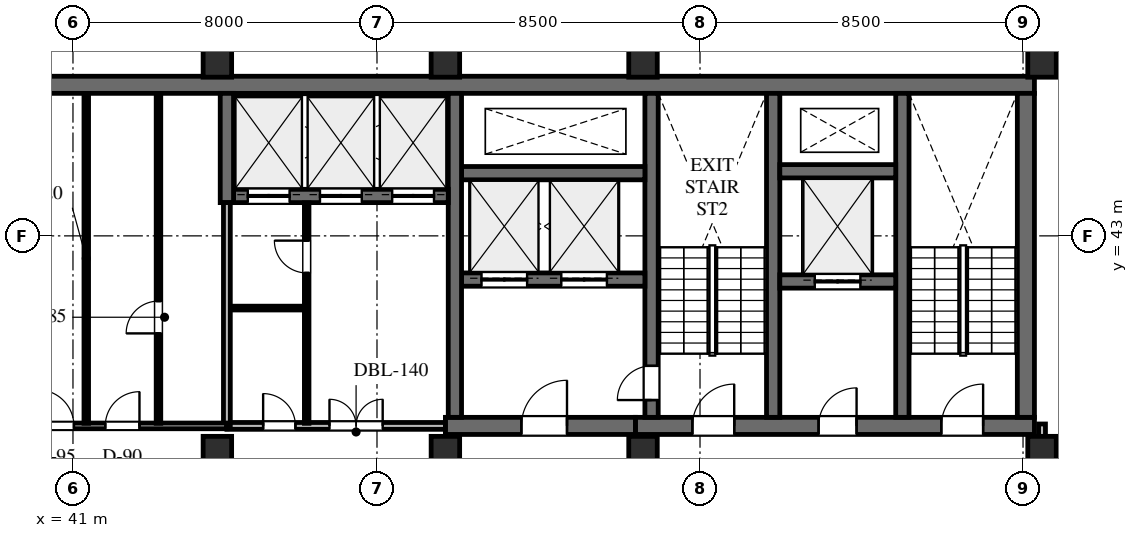
"""IFC4 building model, lengths in metres.
Left out: names, types, materials, properties, quantities, classifications, styles, units other than length and angle.
Written with IfcOpenShell. Run it as: python <this file> out.ifc"""

import sys

from ifc_helpers import new_model, si_unit, direction, frame, frame_2d, origin, origin_2d, place, context, subcontext, project, spatial, rectangle, extrude, element, fill, save


model = new_model("IFC4")
c1 = context("Model", 3, precision=1e-05, world=origin(), true_north=direction((0.0, 1.0)))
c2 = subcontext(c1, "Body", "Model", "MODEL_VIEW")
j1 = project(units=[si_unit("LENGTHUNIT", "METRE"), si_unit("PLANEANGLEUNIT", "RADIAN")], contexts=[c1])
p1 = place(None, origin())
s1 = spatial("IfcSite", under=j1, at=p1, CompositionType="ELEMENT")
p2 = place(p1, origin())
s2 = spatial("IfcBuilding", under=s1, at=p2, CompositionType="ELEMENT")
p3 = place(p2, frame((0.0, 0.0, 241.8)))
s3 = spatial("IfcBuildingStorey", under=s2, at=p3, CompositionType="ELEMENT", Elevation=241.8)
p4 = place(p3, frame((22.9, 46.975, 0.0), z_axis=(0.0, 0.0, 1.0), x_axis=(1.0, 0.0, 0.0)))
e1 = element("IfcWall", 1, at=p4, inside=s3, PredefinedType="SHEAR", context=c2, shape_type="SweptSolid", body=[
    extrude(rectangle(XDim=43.4, YDim=0.45, at=frame_2d((21.7, 0.0))), origin(), (0.0, 0.0, 1.0), 3.6),
])
p5 = place(p3, frame((55.8, 38.0, 0.0), z_axis=(0.0, 0.0, 1.0), x_axis=(1.0, 0.0, 0.0)))
e2 = element("IfcWall", 2, at=p5, inside=s3, PredefinedType="SHEAR", context=c2, shape_type="SweptSolid", body=[
    extrude(rectangle(XDim=10.5, YDim=0.45, at=frame_2d((5.25, 0.0))), origin(), (0.0, 0.0, 1.0), 3.6),
])
p6 = place(p5, frame((1.5, 0.0, 0.0)))
e3 = element("IfcOpeningElement", 3, at=p6, cuts=e2, PredefinedType="OPENING", context=c2, shape_type="SweptSolid", body=[
    extrude(rectangle(XDim=1.1, YDim=2.2, at=frame_2d((0.55, 1.1))), frame((0.0, 0.235, 0.0), z_axis=(0.0, -1.0, 0.0), x_axis=(1.0, 0.0, 0.0)), (0.0, 0.0, 1.0), 0.47),
])
p7 = place(p5, frame((4.82, 0.0, 0.0)))
e4 = element("IfcOpeningElement", 4, at=p7, cuts=e2, PredefinedType="OPENING", context=c2, shape_type="SweptSolid", body=[
    extrude(rectangle(XDim=1.0, YDim=2.15, at=frame_2d((0.5, 1.075))), frame((0.0, 0.235, 0.0), z_axis=(0.0, -1.0, 0.0), x_axis=(1.0, 0.0, 0.0)), (0.0, 0.0, 1.0), 0.47),
])
p8 = place(p5, frame((8.05, 0.0, 0.0)))
e5 = element("IfcOpeningElement", 5, at=p8, cuts=e2, PredefinedType="OPENING", context=c2, shape_type="SweptSolid", body=[
    extrude(rectangle(XDim=1.1, YDim=2.2, at=frame_2d((0.55, 1.1))), frame((0.0, 0.235, 0.0), z_axis=(0.0, -1.0, 0.0), x_axis=(1.0, 0.0, 0.0)), (0.0, 0.0, 1.0), 0.47),
])
p9 = place(p3, frame((66.075, 38.225, 0.0), z_axis=(0.0, 0.0, 1.0), x_axis=(0.0, 1.0, 0.0)))
e6 = element("IfcWall", 6, at=p9, inside=s3, PredefinedType="SHEAR", context=c2, shape_type="SweptSolid", body=[
    extrude(rectangle(XDim=8.525, YDim=0.45, at=frame_2d((4.262, 0.0))), origin(), (0.0, 0.0, 1.0), 3.6),
])
for number, where, z_axis, x_axis in (
    (7, (62.825, 38.225, 0.0), (0.0, 0.0, 1.0), (0.0, 1.0, 0.0)),
    (8, (59.425, 38.225, 0.0), (0.0, 0.0, 1.0), (0.0, 1.0, 0.0)),
):
    element("IfcWall", number, at=place(p3, frame(where, z_axis=z_axis, x_axis=x_axis)), inside=s3, PredefinedType="SHEAR", context=c2, shape_type="SweptSolid", body=[
        extrude(rectangle(XDim=8.525, YDim=0.35, at=frame_2d((4.262, 0.0))), origin(), (0.0, 0.0, 1.0), 3.6),
    ])
p10 = place(p3, frame((56.225, 38.225, 0.0), z_axis=(0.0, 0.0, 1.0), x_axis=(0.0, 1.0, 0.0)))
e9 = element("IfcWall", 9, at=p10, inside=s3, PredefinedType="SHEAR", context=c2, shape_type="SweptSolid", body=[
    extrude(rectangle(XDim=8.525, YDim=0.35, at=frame_2d((4.262, 0.0))), origin(), (0.0, 0.0, 1.0), 3.6),
])
p11 = place(p10, frame((0.455, 0.0, 0.0)))
e10 = element("IfcOpeningElement", 10, at=p11, cuts=e9, PredefinedType="OPENING", context=c2, shape_type="SweptSolid", body=[
    extrude(rectangle(XDim=0.9, YDim=2.15, at=frame_2d((0.45, 1.075))), frame((0.0, 0.185, 0.0), z_axis=(0.0, -1.0, 0.0), x_axis=(1.0, 0.0, 0.0)), (0.0, 0.0, 1.0), 0.37),
])
p12 = place(p3, frame((59.6, 41.8, 0.0), z_axis=(0.0, 0.0, 1.0), x_axis=(1.0, 0.0, 0.0)))
e11 = element("IfcWall", 11, at=p12, inside=s3, PredefinedType="SHEAR", context=c2, shape_type="SweptSolid", body=[
    extrude(rectangle(XDim=3.05, YDim=0.35, at=frame_2d((1.525, 0.0))), origin(), (0.0, 0.0, 1.0), 3.6),
])
p13 = place(p12, frame((0.92, 0.0, 0.0)))
e12 = element("IfcOpeningElement", 12, at=p13, cuts=e11, PredefinedType="OPENING", context=c2, shape_type="SweptSolid", body=[
    extrude(rectangle(XDim=1.2, YDim=2.2, at=frame_2d((0.6, 1.1))), frame((0.0, 0.185, 0.0), z_axis=(0.0, -1.0, 0.0), x_axis=(1.0, 0.0, 0.0)), (0.0, 0.0, 1.0), 0.37),
])
p14 = place(p3, frame((59.6, 44.7, 0.0), z_axis=(0.0, 0.0, 1.0), x_axis=(1.0, 0.0, 0.0)))
e13 = element("IfcWall", 13, at=p14, inside=s3, PredefinedType="SHEAR", context=c2, shape_type="SweptSolid", body=[
    extrude(rectangle(XDim=3.05, YDim=0.35, at=frame_2d((1.525, 0.0))), origin(), (0.0, 0.0, 1.0), 3.6),
])
p15 = place(p3, frame((50.8, 38.0, 0.0), z_axis=(0.0, 0.0, 1.0), x_axis=(1.0, 0.0, 0.0)))
e14 = element("IfcWall", 14, at=p15, inside=s3, PredefinedType="SHEAR", context=c2, shape_type="SweptSolid", body=[
    extrude(rectangle(XDim=5.0, YDim=0.45, at=frame_2d((2.5, 0.0))), origin(), (0.0, 0.0, 1.0), 3.6),
])
p16 = place(p15, frame((2.0, 0.0, 0.0)))
e15 = element("IfcOpeningElement", 15, at=p16, cuts=e14, PredefinedType="OPENING", context=c2, shape_type="SweptSolid", body=[
    extrude(rectangle(XDim=1.2, YDim=2.2, at=frame_2d((0.6, 1.1))), frame((0.0, 0.235, 0.0), z_axis=(0.0, -1.0, 0.0), x_axis=(1.0, 0.0, 0.0)), (0.0, 0.0, 1.0), 0.47),
])
p17 = place(p3, frame((51.225, 41.85, 0.0), z_axis=(0.0, 0.0, 1.0), x_axis=(1.0, 0.0, 0.0)))
e16 = element("IfcWall", 16, at=p17, inside=s3, PredefinedType="SHEAR", context=c2, shape_type="SweptSolid", body=[
    extrude(rectangle(XDim=4.825, YDim=0.35, at=frame_2d((2.413, 0.0))), origin(), (0.0, 0.0, 1.0), 3.6),
])
p18 = place(p17, frame((0.525, 0.0, 0.0)))
e17 = element("IfcOpeningElement", 17, at=p18, cuts=e16, PredefinedType="OPENING", context=c2, shape_type="SweptSolid", body=[
    extrude(rectangle(XDim=1.2, YDim=2.2, at=frame_2d((0.6, 1.1))), frame((0.0, 0.185, 0.0), z_axis=(0.0, -1.0, 0.0), x_axis=(1.0, 0.0, 0.0)), (0.0, 0.0, 1.0), 0.37),
])
p19 = place(p17, frame((2.625, 0.0, 0.0)))
e18 = element("IfcOpeningElement", 18, at=p19, cuts=e16, PredefinedType="OPENING", context=c2, shape_type="SweptSolid", body=[
    extrude(rectangle(XDim=1.2, YDim=2.2, at=frame_2d((0.6, 1.1))), frame((0.0, 0.185, 0.0), z_axis=(0.0, -1.0, 0.0), x_axis=(1.0, 0.0, 0.0)), (0.0, 0.0, 1.0), 0.37),
])
p20 = place(p3, frame((51.225, 44.65, 0.0), z_axis=(0.0, 0.0, 1.0), x_axis=(1.0, 0.0, 0.0)))
e19 = element("IfcWall", 19, at=p20, inside=s3, PredefinedType="SHEAR", context=c2, shape_type="SweptSolid", body=[
    extrude(rectangle(XDim=4.825, YDim=0.35, at=frame_2d((2.413, 0.0))), origin(), (0.0, 0.0, 1.0), 3.6),
])
p21 = place(p3, frame((51.05, 38.225, 0.0), z_axis=(0.0, 0.0, 1.0), x_axis=(0.0, 1.0, 0.0)))
e20 = element("IfcWall", 20, at=p21, inside=s3, PredefinedType="SHEAR", context=c2, shape_type="SweptSolid", body=[
    extrude(rectangle(XDim=8.525, YDim=0.35, at=frame_2d((4.262, 0.0))), origin(), (0.0, 0.0, 1.0), 3.6),
])
p22 = place(p3, frame((45.225, 44.05, 0.0), z_axis=(0.0, 0.0, 1.0), x_axis=(1.0, 0.0, 0.0)))
e21 = element("IfcWall", 21, at=p22, inside=s3, PredefinedType="SHEAR", context=c2, shape_type="SweptSolid", body=[
    extrude(rectangle(XDim=5.65, YDim=0.35, at=frame_2d((2.825, 0.0))), origin(), (0.0, 0.0, 1.0), 3.6),
])
p23 = place(p22, frame((0.375, 0.0, 0.0)))
e22 = element("IfcOpeningElement", 22, at=p23, cuts=e21, PredefinedType="OPENING", context=c2, shape_type="SweptSolid", body=[
    extrude(rectangle(XDim=1.1, YDim=2.2, at=frame_2d((0.55, 1.1))), frame((0.0, 0.185, 0.0), z_axis=(0.0, -1.0, 0.0), x_axis=(1.0, 0.0, 0.0)), (0.0, 0.0, 1.0), 0.37),
])
p24 = place(p22, frame((2.275, 0.0, 0.0)))
e23 = element("IfcOpeningElement", 23, at=p24, cuts=e21, PredefinedType="OPENING", context=c2, shape_type="SweptSolid", body=[
    extrude(rectangle(XDim=1.1, YDim=2.2, at=frame_2d((0.55, 1.1))), frame((0.0, 0.185, 0.0), z_axis=(0.0, -1.0, 0.0), x_axis=(1.0, 0.0, 0.0)), (0.0, 0.0, 1.0), 0.37),
])
p25 = place(p22, frame((4.175, 0.0, 0.0)))
e24 = element("IfcOpeningElement", 24, at=p25, cuts=e21, PredefinedType="OPENING", context=c2, shape_type="SweptSolid", body=[
    extrude(rectangle(XDim=1.1, YDim=2.2, at=frame_2d((0.55, 1.1))), frame((0.0, 0.185, 0.0), z_axis=(0.0, -1.0, 0.0), x_axis=(1.0, 0.0, 0.0)), (0.0, 0.0, 1.0), 0.37),
])
p26 = place(p3, frame((45.05, 43.875, 0.0), z_axis=(0.0, 0.0, 1.0), x_axis=(0.0, 1.0, 0.0)))
e25 = element("IfcWall", 25, at=p26, inside=s3, PredefinedType="SHEAR", context=c2, shape_type="SweptSolid", body=[
    extrude(rectangle(XDim=2.875, YDim=0.35, at=frame_2d((1.438, 0.0))), origin(), (0.0, 0.0, 1.0), 3.6),
])
for number, where, z_axis, x_axis in (
    (26, (66.5, 47.55, 0.0), (0.0, 0.0, 1.0), (1.0, 0.0, 0.0)),
    (27, (56.0, 47.55, 0.0), (0.0, 0.0, 1.0), (1.0, 0.0, 0.0)),
    (28, (66.5, 37.35, 0.0), (0.0, 0.0, 1.0), (1.0, 0.0, 0.0)),
    (29, (56.0, 37.35, 0.0), (0.0, 0.0, 1.0), (1.0, 0.0, 0.0)),
    (30, (50.8, 47.55, 0.0), (0.0, 0.0, 1.0), (1.0, 0.0, 0.0)),
    (31, (50.8, 37.35, 0.0), (0.0, 0.0, 1.0), (1.0, 0.0, 0.0)),
    (32, (44.8, 37.35, 0.0), (0.0, 0.0, 1.0), (1.0, 0.0, 0.0)),
    (33, (44.8, 47.55, 0.0), (0.0, 0.0, 1.0), (1.0, 0.0, 0.0)),
):
    element("IfcColumn", number, at=place(p3, frame(where, z_axis=z_axis, x_axis=x_axis)), inside=s3, PredefinedType="COLUMN", context=c2, shape_type="SweptSolid", body=[
        extrude(rectangle(XDim=0.75, YDim=0.75, at=origin_2d()), origin(), (0.0, 0.0, 1.0), 3.6),
    ])
p27 = place(p3, frame((68.375, 37.8, 0.0), z_axis=(0.0, 0.0, 1.0), x_axis=(-0.139164922175, -0.99026921816, 0.0)))
e34 = element("IfcWall", 34, at=p27, inside=s3, PredefinedType="STANDARD", context=c2, shape_type="SweptSolid", body=[
    extrude(rectangle(XDim=19.347, YDim=0.28, at=frame_2d((9.673, 0.0))), origin(), (0.0, 0.0, 1.0), 3.35),
])
p28 = place(p27, frame((8.36, 0.0, 0.0)))
e35 = element("IfcOpeningElement", 35, at=p28, cuts=e34, PredefinedType="OPENING", context=c2, shape_type="SweptSolid", body=[
    extrude(rectangle(XDim=1.0, YDim=2.15, at=frame_2d((0.5, 1.075))), frame((0.0, 0.15, 0.0), z_axis=(0.0, -1.0, 0.0), x_axis=(1.0, 0.0, 0.0)), (0.0, 0.0, 1.0), 0.3),
])
p29 = place(p27, frame((3.971, 0.0, 0.65)))
e36 = element("IfcOpeningElement", 36, at=p29, cuts=e34, PredefinedType="OPENING", context=c2, shape_type="SweptSolid", body=[
    extrude(rectangle(XDim=1.8, YDim=2.1, at=frame_2d((0.9, 1.05))), frame((0.0, 0.15, 0.0), z_axis=(0.0, -1.0, 0.0), x_axis=(1.0, 0.0, 0.0)), (0.0, 0.0, 1.0), 0.3),
])
p30 = place(p27, frame((12.975, 0.0, 0.65)))
e37 = element("IfcOpeningElement", 37, at=p30, cuts=e34, PredefinedType="OPENING", context=c2, shape_type="SweptSolid", body=[
    extrude(rectangle(XDim=1.8, YDim=2.1, at=frame_2d((0.9, 1.05))), frame((0.0, 0.15, 0.0), z_axis=(0.0, -1.0, 0.0), x_axis=(1.0, 0.0, 0.0)), (0.0, 0.0, 1.0), 0.3),
])
p31 = place(p3, frame((45.05, 38.0, 0.0), z_axis=(0.0, 0.0, 1.0), x_axis=(1.0, 0.0, 0.0)))
e38 = element("IfcWall", 38, at=p31, inside=s3, PredefinedType="STANDARD", context=c2, shape_type="SweptSolid", body=[
    extrude(rectangle(XDim=5.75, YDim=0.18, at=frame_2d((2.875, 0.0))), origin(), (0.0, 0.0, 1.0), 2.654),
])
p32 = place(p31, frame((0.954, 0.0, 0.0)))
e39 = element("IfcOpeningElement", 39, at=p32, cuts=e38, PredefinedType="OPENING", context=c2, shape_type="SweptSolid", body=[
    extrude(rectangle(XDim=0.85, YDim=2.1, at=frame_2d((0.425, 1.05))), frame((0.0, 0.1, 0.0), z_axis=(0.0, -1.0, 0.0), x_axis=(1.0, 0.0, 0.0)), (0.0, 0.0, 1.0), 0.2),
])
p33 = place(p31, frame((2.7, 0.0, 0.0)))
e40 = element("IfcOpeningElement", 40, at=p33, cuts=e38, PredefinedType="OPENING", context=c2, shape_type="SweptSolid", body=[
    extrude(rectangle(XDim=1.4, YDim=2.2, at=frame_2d((0.7, 1.1))), frame((0.0, 0.1, 0.0), z_axis=(0.0, -1.0, 0.0), x_axis=(1.0, 0.0, 0.0)), (0.0, 0.0, 1.0), 0.2),
])
p34 = place(p3, frame((47.15, 38.068, 0.0), z_axis=(0.0, 0.0, 1.0), x_axis=(0.0, 1.0, 0.0)))
e41 = element("IfcWall", 41, at=p34, inside=s3, PredefinedType="PARTITIONING", context=c2, shape_type="SweptSolid", body=[
    extrude(rectangle(XDim=5.799, YDim=0.12, at=frame_2d((2.899, 0.0))), origin(), (0.0, 0.0, 1.0), 3.35),
])
p35 = place(p34, frame((3.957, 0.0, 0.0)))
e42 = element("IfcOpeningElement", 42, at=p35, cuts=e41, PredefinedType="OPENING", context=c2, shape_type="SweptSolid", body=[
    extrude(rectangle(XDim=0.85, YDim=2.1, at=frame_2d((0.425, 1.05))), frame((0.0, 0.07, 0.0), z_axis=(0.0, -1.0, 0.0), x_axis=(1.0, 0.0, 0.0)), (0.0, 0.0, 1.0), 0.14),
])
p36 = place(p3, frame((45.118, 41.1, 0.0), z_axis=(0.0, 0.0, 1.0), x_axis=(1.0, 0.0, 0.0)))
e43 = element("IfcWall", 43, at=p36, inside=s3, PredefinedType="PARTITIONING", context=c2, shape_type="SweptSolid", body=[
    extrude(rectangle(XDim=1.964, YDim=0.1, at=frame_2d((0.982, 0.0))), origin(), (0.0, 0.0, 1.0), 3.35),
])
p37 = place(p3, frame((45.05, 38.0, 0.0), z_axis=(0.0, 0.0, 1.0), x_axis=(0.0, 1.0, 0.0)))
e44 = element("IfcWall", 44, at=p37, inside=s3, PredefinedType="STANDARD", context=c2, shape_type="SweptSolid", body=[
    extrude(rectangle(XDim=5.875, YDim=0.18, at=frame_2d((2.938, 0.0))), origin(), (0.0, 0.0, 1.0), 2.654),
])
p38 = place(p3, frame((27.05, 38.0, 0.0), z_axis=(0.0, 0.0, 1.0), x_axis=(1.0, 0.0, 0.0)))
e45 = element("IfcWall", 45, at=p38, inside=s3, PredefinedType="PARTITIONING", context=c2, shape_type="SweptSolid", body=[
    extrude(rectangle(XDim=18.0, YDim=0.15, at=frame_2d((9.0, 0.0))), origin(), (0.0, 0.0, 1.0), 2.654),
])
p39 = place(p38, frame((13.025, 0.0, 0.0)))
e46 = element("IfcOpeningElement", 46, at=p39, cuts=e45, PredefinedType="OPENING", context=c2, shape_type="SweptSolid", body=[
    extrude(rectangle(XDim=0.95, YDim=2.15, at=frame_2d((0.475, 1.075))), frame((0.0, 0.085, 0.0), z_axis=(0.0, -1.0, 0.0), x_axis=(1.0, 0.0, 0.0)), (0.0, 0.0, 1.0), 0.17),
])
p40 = place(p38, frame((14.8, 0.0, 0.0)))
e47 = element("IfcOpeningElement", 47, at=p40, cuts=e45, PredefinedType="OPENING", context=c2, shape_type="SweptSolid", body=[
    extrude(rectangle(XDim=0.9, YDim=2.1, at=frame_2d((0.45, 1.05))), frame((0.0, 0.085, 0.0), z_axis=(0.0, -1.0, 0.0), x_axis=(1.0, 0.0, 0.0)), (0.0, 0.0, 1.0), 0.17),
])
p41 = place(p3, frame((41.35, 38.068, 0.0), z_axis=(0.0, 0.0, 1.0), x_axis=(0.0, 1.0, 0.0)))
e48 = element("IfcWall", 48, at=p41, inside=s3, PredefinedType="PARTITIONING", context=c2, shape_type="SweptSolid", body=[
    extrude(rectangle(XDim=8.674, YDim=0.12, at=frame_2d((4.337, 0.0))), origin(), (0.0, 0.0, 1.0), 3.35),
])
p42 = place(p3, frame((43.25, 38.068, 0.0), z_axis=(0.0, 0.0, 1.0), x_axis=(0.0, 1.0, 0.0)))
e49 = element("IfcWall", 49, at=p42, inside=s3, PredefinedType="PARTITIONING", context=c2, shape_type="SweptSolid", body=[
    extrude(rectangle(XDim=8.674, YDim=0.12, at=frame_2d((4.337, 0.0))), origin(), (0.0, 0.0, 1.0), 3.35),
])
p43 = place(p42, frame((2.366, 0.0, 0.0)))
e50 = element("IfcOpeningElement", 50, at=p43, cuts=e49, PredefinedType="OPENING", context=c2, shape_type="SweptSolid", body=[
    extrude(rectangle(XDim=0.85, YDim=2.1, at=frame_2d((0.425, 1.05))), frame((0.0, 0.07, 0.0), z_axis=(0.0, -1.0, 0.0), x_axis=(1.0, 0.0, 0.0)), (0.0, 0.0, 1.0), 0.14),
])
p44 = place(p3, frame((66.5, 34.468, 0.0), z_axis=(0.0, 0.0, 1.0), x_axis=(0.0, 1.0, 0.0)))
e51 = element("IfcWall", 51, at=p44, inside=s3, PredefinedType="STANDARD", context=c2, shape_type="SweptSolid", body=[
    extrude(rectangle(XDim=3.582, YDim=0.18, at=frame_2d((1.791, 0.0))), origin(), (0.0, 0.0, 1.0), 2.654),
])
p45 = place(p6, origin())
e52 = element("IfcDoor", 52, at=p45, inside=s3, OperationType="SINGLE_SWING_RIGHT", PredefinedType="DOOR", context=c2, shape_type="SweptSolid", body=[
    extrude(rectangle(XDim=1.1, YDim=2.2, at=frame_2d((0.55, 1.1))), frame((0.0, 0.025, 0.0), z_axis=(0.0, -1.0, 0.0), x_axis=(1.0, 0.0, 0.0)), (0.0, 0.0, 1.0), 0.05),
])
fill(e3, e52)
p46 = place(p7, origin())
e53 = element("IfcDoor", 53, at=p46, inside=s3, OperationType="SINGLE_SWING_RIGHT", PredefinedType="DOOR", context=c2, shape_type="SweptSolid", body=[
    extrude(rectangle(XDim=1.0, YDim=2.15, at=frame_2d((0.5, 1.075))), frame((0.0, 0.025, 0.0), z_axis=(0.0, -1.0, 0.0), x_axis=(1.0, 0.0, 0.0)), (0.0, 0.0, 1.0), 0.05),
])
fill(e4, e53)
p47 = place(p8, origin())
e54 = element("IfcDoor", 54, at=p47, inside=s3, OperationType="SINGLE_SWING_RIGHT", PredefinedType="DOOR", context=c2, shape_type="SweptSolid", body=[
    extrude(rectangle(XDim=1.1, YDim=2.2, at=frame_2d((0.55, 1.1))), frame((0.0, 0.025, 0.0), z_axis=(0.0, -1.0, 0.0), x_axis=(1.0, 0.0, 0.0)), (0.0, 0.0, 1.0), 0.05),
])
fill(e5, e54)
p48 = place(p16, origin())
e55 = element("IfcDoor", 55, at=p48, inside=s3, OperationType="SINGLE_SWING_RIGHT", PredefinedType="DOOR", context=c2, shape_type="SweptSolid", body=[
    extrude(rectangle(XDim=1.2, YDim=2.2, at=frame_2d((0.6, 1.1))), frame((0.0, 0.025, 0.0), z_axis=(0.0, -1.0, 0.0), x_axis=(1.0, 0.0, 0.0)), (0.0, 0.0, 1.0), 0.05),
])
fill(e15, e55)
p49 = place(p11, origin())
e56 = element("IfcDoor", 56, at=p49, inside=s3, OperationType="SINGLE_SWING_LEFT", PredefinedType="DOOR", context=c2, shape_type="SweptSolid", body=[
    extrude(rectangle(XDim=0.9, YDim=2.15, at=frame_2d((0.45, 1.075))), frame((0.0, 0.025, 0.0), z_axis=(0.0, -1.0, 0.0), x_axis=(1.0, 0.0, 0.0)), (0.0, 0.0, 1.0), 0.05),
])
fill(e10, e56)
p50 = place(p23, origin())
e57 = element("IfcDoor", 57, at=p50, inside=s3, OperationType="DOUBLE_DOOR_SLIDING", PredefinedType="DOOR", context=c2, shape_type="SweptSolid", body=[
    extrude(rectangle(XDim=1.1, YDim=2.2, at=frame_2d((0.55, 1.1))), frame((0.0, 0.025, 0.0), z_axis=(0.0, -1.0, 0.0), x_axis=(1.0, 0.0, 0.0)), (0.0, 0.0, 1.0), 0.05),
])
fill(e22, e57)
p51 = place(p24, origin())
e58 = element("IfcDoor", 58, at=p51, inside=s3, OperationType="DOUBLE_DOOR_SLIDING", PredefinedType="DOOR", context=c2, shape_type="SweptSolid", body=[
    extrude(rectangle(XDim=1.1, YDim=2.2, at=frame_2d((0.55, 1.1))), frame((0.0, 0.025, 0.0), z_axis=(0.0, -1.0, 0.0), x_axis=(1.0, 0.0, 0.0)), (0.0, 0.0, 1.0), 0.05),
])
fill(e23, e58)
p52 = place(p25, origin())
e59 = element("IfcDoor", 59, at=p52, inside=s3, OperationType="DOUBLE_DOOR_SLIDING", PredefinedType="DOOR", context=c2, shape_type="SweptSolid", body=[
    extrude(rectangle(XDim=1.1, YDim=2.2, at=frame_2d((0.55, 1.1))), frame((0.0, 0.025, 0.0), z_axis=(0.0, -1.0, 0.0), x_axis=(1.0, 0.0, 0.0)), (0.0, 0.0, 1.0), 0.05),
])
fill(e24, e59)
p53 = place(p18, origin())
e60 = element("IfcDoor", 60, at=p53, inside=s3, OperationType="DOUBLE_DOOR_SLIDING", PredefinedType="DOOR", context=c2, shape_type="SweptSolid", body=[
    extrude(rectangle(XDim=1.2, YDim=2.2, at=frame_2d((0.6, 1.1))), frame((0.0, 0.025, 0.0), z_axis=(0.0, -1.0, 0.0), x_axis=(1.0, 0.0, 0.0)), (0.0, 0.0, 1.0), 0.05),
])
fill(e17, e60)
p54 = place(p19, origin())
e61 = element("IfcDoor", 61, at=p54, inside=s3, OperationType="DOUBLE_DOOR_SLIDING", PredefinedType="DOOR", context=c2, shape_type="SweptSolid", body=[
    extrude(rectangle(XDim=1.2, YDim=2.2, at=frame_2d((0.6, 1.1))), frame((0.0, 0.025, 0.0), z_axis=(0.0, -1.0, 0.0), x_axis=(1.0, 0.0, 0.0)), (0.0, 0.0, 1.0), 0.05),
])
fill(e18, e61)
p55 = place(p13, origin())
e62 = element("IfcDoor", 62, at=p55, inside=s3, OperationType="DOUBLE_DOOR_SLIDING", PredefinedType="DOOR", context=c2, shape_type="SweptSolid", body=[
    extrude(rectangle(XDim=1.2, YDim=2.2, at=frame_2d((0.6, 1.1))), frame((0.0, 0.025, 0.0), z_axis=(0.0, -1.0, 0.0), x_axis=(1.0, 0.0, 0.0)), (0.0, 0.0, 1.0), 0.05),
])
fill(e12, e62)
p56 = place(p32, origin())
e63 = element("IfcDoor", 63, at=p56, inside=s3, OperationType="SINGLE_SWING_LEFT", PredefinedType="DOOR", context=c2, shape_type="SweptSolid", body=[
    extrude(rectangle(XDim=0.85, YDim=2.1, at=frame_2d((0.425, 1.05))), frame((0.0, 0.025, 0.0), z_axis=(0.0, -1.0, 0.0), x_axis=(1.0, 0.0, 0.0)), (0.0, 0.0, 1.0), 0.05),
])
fill(e39, e63)
p57 = place(p35, origin())
e64 = element("IfcDoor", 64, at=p57, inside=s3, OperationType="SINGLE_SWING_RIGHT", PredefinedType="DOOR", context=c2, shape_type="SweptSolid", body=[
    extrude(rectangle(XDim=0.85, YDim=2.1, at=frame_2d((0.425, 1.05))), frame((0.0, 0.025, 0.0), z_axis=(0.0, -1.0, 0.0), x_axis=(1.0, 0.0, 0.0)), (0.0, 0.0, 1.0), 0.05),
])
fill(e42, e64)
p58 = place(p33, origin())
e65 = element("IfcDoor", 65, at=p58, inside=s3, OperationType="DOUBLE_DOOR_SINGLE_SWING", PredefinedType="DOOR", context=c2, shape_type="SweptSolid", body=[
    extrude(rectangle(XDim=1.4, YDim=2.2, at=frame_2d((0.7, 1.1))), frame((0.0, 0.025, 0.0), z_axis=(0.0, -1.0, 0.0), x_axis=(1.0, 0.0, 0.0)), (0.0, 0.0, 1.0), 0.05),
])
fill(e40, e65)
p59 = place(p39, origin())
e66 = element("IfcDoor", 66, at=p59, inside=s3, OperationType="SINGLE_SWING_LEFT", PredefinedType="DOOR", context=c2, shape_type="SweptSolid", body=[
    extrude(rectangle(XDim=0.95, YDim=2.15, at=frame_2d((0.475, 1.075))), frame((0.0, 0.025, 0.0), z_axis=(0.0, -1.0, 0.0), x_axis=(1.0, 0.0, 0.0)), (0.0, 0.0, 1.0), 0.05),
])
fill(e46, e66)
p60 = place(p40, origin())
e67 = element("IfcDoor", 67, at=p60, inside=s3, OperationType="SINGLE_SWING_RIGHT", PredefinedType="DOOR", context=c2, shape_type="SweptSolid", body=[
    extrude(rectangle(XDim=0.9, YDim=2.1, at=frame_2d((0.45, 1.05))), frame((0.0, 0.025, 0.0), z_axis=(0.0, -1.0, 0.0), x_axis=(1.0, 0.0, 0.0)), (0.0, 0.0, 1.0), 0.05),
])
fill(e47, e67)
p61 = place(p43, origin())
e68 = element("IfcDoor", 68, at=p61, inside=s3, OperationType="SINGLE_SWING_LEFT", PredefinedType="DOOR", context=c2, shape_type="SweptSolid", body=[
    extrude(rectangle(XDim=0.85, YDim=2.1, at=frame_2d((0.425, 1.05))), frame((0.0, 0.025, 0.0), z_axis=(0.0, -1.0, 0.0), x_axis=(1.0, 0.0, 0.0)), (0.0, 0.0, 1.0), 0.05),
])
fill(e50, e68)
save(model, sys.argv[1])
